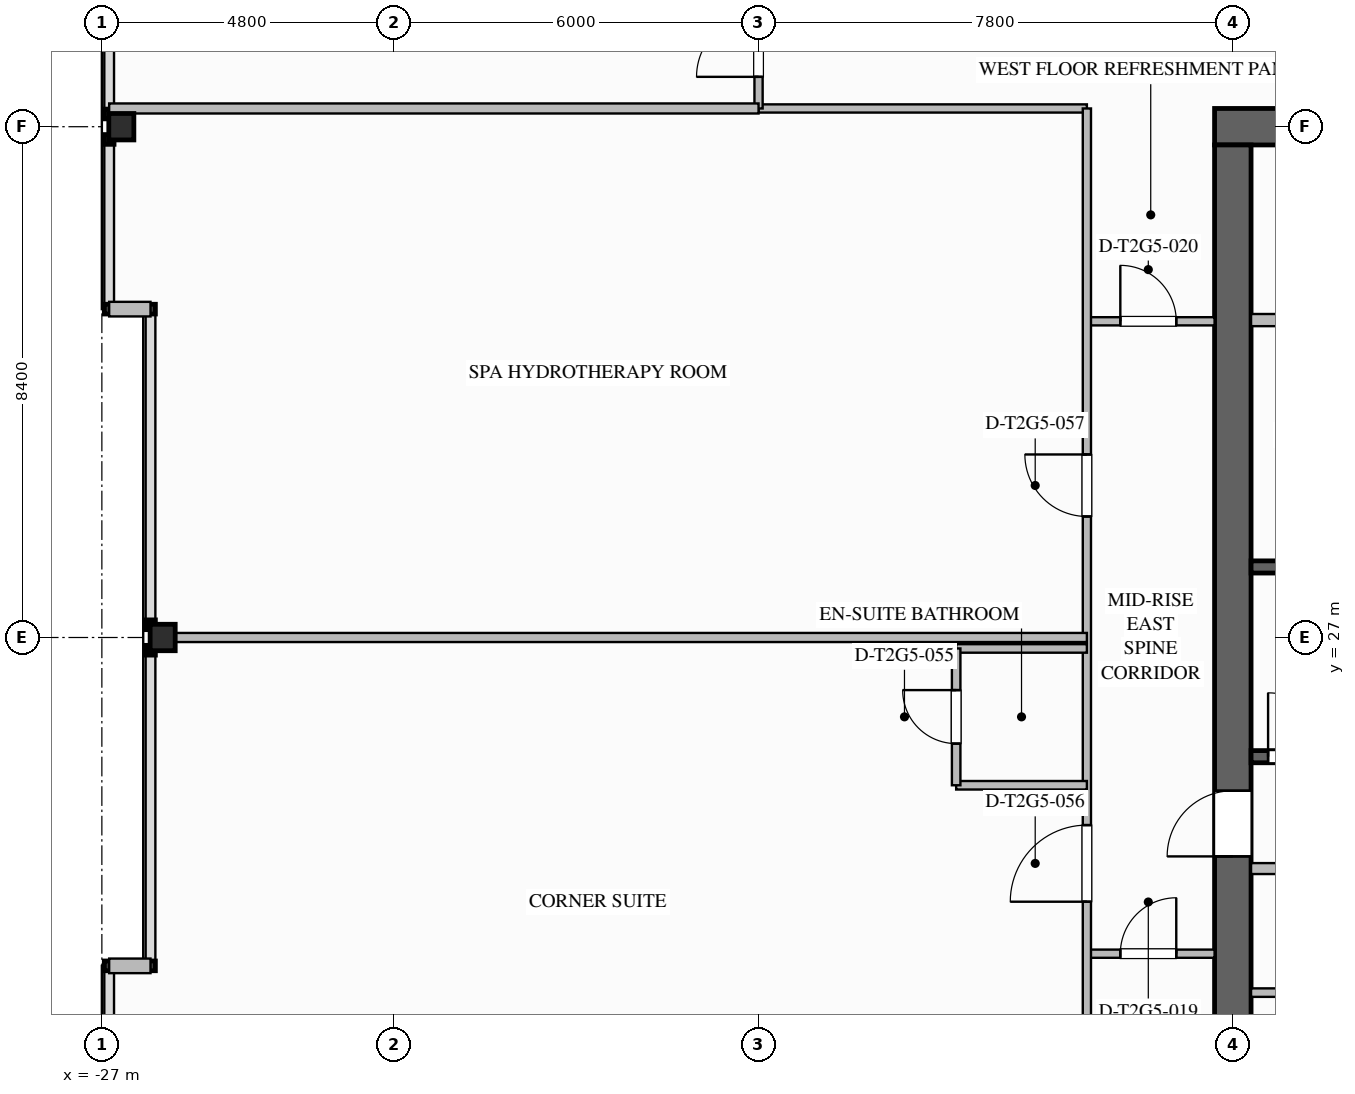
"""IFC4 building model, lengths in metres.
Left out: names, types, materials, properties, quantities, classifications, styles, units other than length and angle.
Written with IfcOpenShell. Run it as: python <this file> out.ifc"""

import sys

from ifc_helpers import new_model, si_unit, direction, frame, frame_2d, origin, origin_2d, place, context, subcontext, project, spatial, rectangle, i_section, extrude, element, fill, save


model = new_model("IFC4")
c1 = context("Model", 3, precision=1e-05, world=origin(), true_north=direction((0.0, 1.0)))
c2 = subcontext(c1, "Body", "Model", "MODEL_VIEW")
j1 = project(units=[si_unit("LENGTHUNIT", "METRE"), si_unit("PLANEANGLEUNIT", "RADIAN")], contexts=[c1])
p1 = place(None, origin())
s1 = spatial("IfcSite", under=j1, at=p1, CompositionType="ELEMENT")
p2 = place(p1, origin())
s2 = spatial("IfcBuilding", under=s1, at=p2, CompositionType="ELEMENT")
p3 = place(p2, frame((0.0, 0.0, 133.8)))
s3 = spatial("IfcBuildingStorey", under=s2, at=p3, CompositionType="ELEMENT", Elevation=133.8)
p4 = place(p3, frame((-8.7, 35.4, 0.0), z_axis=(0.0, 0.0, 1.0), x_axis=(1.0, 0.0, 0.0)))
e1 = element("IfcWall", 1, at=p4, inside=s3, PredefinedType="SHEAR", context=c2, shape_type="SweptSolid", body=[
    extrude(rectangle(XDim=17.4, YDim=0.6, at=frame_2d((8.7, 0.0))), origin(), (0.0, 0.0, 1.0), 3.5),
])
p5 = place(p3, frame((-8.4, 18.9, 0.0), z_axis=(0.0, 0.0, 1.0), x_axis=(0.0, 1.0, 0.0)))
e2 = element("IfcWall", 2, at=p5, inside=s3, PredefinedType="SHEAR", context=c2, shape_type="SweptSolid", body=[
    extrude(rectangle(XDim=16.2, YDim=0.6, at=frame_2d((8.1, 0.0))), origin(), (0.0, 0.0, 1.0), 3.5),
])
p6 = place(p5, frame((4.5, 0.0, 0.0)))
e3 = element("IfcOpeningElement", 3, at=p6, cuts=e2, PredefinedType="OPENING", context=c2, shape_type="SweptSolid", body=[
    extrude(rectangle(XDim=1.08, YDim=2.04, at=frame_2d((0.54, 1.02))), frame((0.0, 0.31, 0.0), z_axis=(0.0, -1.0, 0.0), x_axis=(1.0, 0.0, 0.0)), (0.0, 0.0, 1.0), 0.62),
])
for number, where, z_axis, x_axis in (
    (4, (-26.0, 27.0, 0.0), (0.0, 0.0, 1.0), (1.0, 0.0, 0.0)),
    (5, (-26.68, 35.4, 0.0), (0.0, 0.0, 1.0), (1.0, 0.0, 0.0)),
):
    element("IfcColumn", number, at=place(p3, frame(where, z_axis=z_axis, x_axis=x_axis)), inside=s3, PredefinedType="COLUMN", context=c2, shape_type="SweptSolid", body=[
        extrude(i_section(OverallWidth=0.412, OverallDepth=0.435, WebThickness=0.036, FlangeThickness=0.057, FilletRadius=0.028, at=origin_2d()), origin(), (0.0, 0.0, 1.0), 3.497),
    ])
for number, where, z_axis, x_axis in (
    (6, (-26.88, 21.6, 0.0), (0.0, 0.0, 1.0), (1.0, 0.0, 0.0)),
    (7, (-26.2, 32.4, 0.0), (0.0, 0.0, 1.0), (-1.0, 0.0, 0.0)),
):
    element("IfcWall", number, at=place(p3, frame(where, z_axis=z_axis, x_axis=x_axis)), inside=s3, PredefinedType="STANDARD", context=c2, shape_type="SweptSolid", body=[
        extrude(rectangle(XDim=0.68, YDim=0.24, at=frame_2d((0.34, 0.0))), origin(), (0.0, 0.0, 1.0), 3.24),
    ])
p7 = place(p3, frame((-8.1, 25.04, 0.0), z_axis=(0.0, 0.0, 1.0), x_axis=(1.0, 0.0, 0.0)))
e8 = element("IfcWall", 8, at=p7, inside=s3, PredefinedType="SOLIDWALL", context=c2, shape_type="SweptSolid", body=[
    extrude(rectangle(XDim=8.1, YDim=0.2, at=frame_2d((4.05, 0.0))), origin(), (0.0, 0.0, 1.0), 3.24),
])
p8 = place(p7, frame((0.28, 0.0, 0.0)))
e9 = element("IfcOpeningElement", 9, at=p8, cuts=e8, PredefinedType="OPENING", context=c2, shape_type="SweptSolid", body=[
    extrude(rectangle(XDim=1.05, YDim=2.1, at=frame_2d((0.525, 1.05))), frame((0.0, 0.11, 0.0), z_axis=(0.0, -1.0, 0.0), x_axis=(1.0, 0.0, 0.0)), (0.0, 0.0, 1.0), 0.22),
])
p9 = place(p3, frame((-8.1, 28.16, 0.0), z_axis=(0.0, 0.0, 1.0), x_axis=(1.0, 0.0, 0.0)))
e10 = element("IfcWall", 10, at=p9, inside=s3, PredefinedType="SOLIDWALL", context=c2, shape_type="SweptSolid", body=[
    extrude(rectangle(XDim=8.1, YDim=0.2, at=frame_2d((4.05, 0.0))), origin(), (0.0, 0.0, 1.0), 3.24),
])
p10 = place(p3, frame((-8.1, 32.22, 0.0), z_axis=(0.0, 0.0, 1.0), x_axis=(1.0, 0.0, 0.0)))
e11 = element("IfcWall", 11, at=p10, inside=s3, PredefinedType="SOLIDWALL", context=c2, shape_type="SweptSolid", body=[
    extrude(rectangle(XDim=7.1, YDim=0.2, at=frame_2d((3.55, 0.0))), origin(), (0.0, 0.0, 1.0), 3.24),
])
p11 = place(p3, frame((-8.1, 23.2, 0.0), z_axis=(0.0, 0.0, 1.0), x_axis=(1.0, 0.0, 0.0)))
e12 = element("IfcWall", 12, at=p11, inside=s3, PredefinedType="SOLIDWALL", context=c2, shape_type="SweptSolid", body=[
    extrude(rectangle(XDim=8.65, YDim=0.18, at=frame_2d((4.325, 0.0))), origin(), (0.0, 0.0, 1.0), 3.24),
])
p12 = place(p11, frame((1.4, 0.0, 0.0)))
e13 = element("IfcOpeningElement", 13, at=p12, cuts=e12, PredefinedType="OPENING", context=c2, shape_type="SweptSolid", body=[
    extrude(rectangle(XDim=1.0, YDim=2.1, at=frame_2d((0.5, 1.05))), frame((0.0, 0.1, 0.0), z_axis=(0.0, -1.0, 0.0), x_axis=(1.0, 0.0, 0.0)), (0.0, 0.0, 1.0), 0.2),
])
p13 = place(p11, frame((5.6, 0.0, 0.0)))
e14 = element("IfcOpeningElement", 14, at=p13, cuts=e12, PredefinedType="OPENING", context=c2, shape_type="SweptSolid", body=[
    extrude(rectangle(XDim=0.92, YDim=2.1, at=frame_2d((0.46, 1.05))), frame((0.0, 0.1, 0.0), z_axis=(0.0, -1.0, 0.0), x_axis=(1.0, 0.0, 0.0)), (0.0, 0.0, 1.0), 0.2),
])
p14 = place(p3, frame((-8.1, 21.16, 0.0), z_axis=(0.0, 0.0, 1.0), x_axis=(1.0, 0.0, 0.0)))
e15 = element("IfcWall", 15, at=p14, inside=s3, PredefinedType="PLUMBINGWALL", context=c2, shape_type="SweptSolid", body=[
    extrude(rectangle(XDim=8.65, YDim=0.14, at=frame_2d((4.325, 0.0))), origin(), (0.0, 0.0, 1.0), 3.24),
])
p15 = place(p14, frame((1.4, 0.0, 0.0)))
e16 = element("IfcOpeningElement", 16, at=p15, cuts=e15, PredefinedType="OPENING", context=c2, shape_type="SweptSolid", body=[
    extrude(rectangle(XDim=0.92, YDim=2.1, at=frame_2d((0.46, 1.05))), frame((0.0, 0.08, 0.0), z_axis=(0.0, -1.0, 0.0), x_axis=(1.0, 0.0, 0.0)), (0.0, 0.0, 1.0), 0.16),
])
p16 = place(p3, frame((-10.8, 21.8, 0.0), z_axis=(0.0, 0.0, 1.0), x_axis=(1.0, 0.0, 0.0)))
e17 = element("IfcWall", 17, at=p16, inside=s3, PredefinedType="PARTITIONING", context=c2, shape_type="SweptSolid", body=[
    extrude(rectangle(XDim=2.1, YDim=0.135, at=frame_2d((1.05, 0.0))), origin(), (0.0, 0.0, 1.0), 3.24),
])
p17 = place(p16, frame((0.55, 0.0, 0.0)))
e18 = element("IfcOpeningElement", 18, at=p17, cuts=e17, PredefinedType="OPENING", context=c2, shape_type="SweptSolid", body=[
    extrude(rectangle(XDim=0.92, YDim=2.1, at=frame_2d((0.46, 1.05))), frame((0.0, 0.077, 0.0), z_axis=(0.0, -1.0, 0.0), x_axis=(1.0, 0.0, 0.0)), (0.0, 0.0, 1.0), 0.155),
])
p18 = place(p3, frame((-10.8, 32.2, 0.0), z_axis=(0.0, 0.0, 1.0), x_axis=(1.0, 0.0, 0.0)))
e19 = element("IfcWall", 19, at=p18, inside=s3, PredefinedType="PARTITIONING", context=c2, shape_type="SweptSolid", body=[
    extrude(rectangle(XDim=2.1, YDim=0.135, at=frame_2d((1.05, 0.0))), origin(), (0.0, 0.0, 1.0), 3.24),
])
p19 = place(p18, frame((0.55, 0.0, 0.0)))
e20 = element("IfcOpeningElement", 20, at=p19, cuts=e19, PredefinedType="OPENING", context=c2, shape_type="SweptSolid", body=[
    extrude(rectangle(XDim=0.92, YDim=2.1, at=frame_2d((0.46, 1.05))), frame((0.0, 0.077, 0.0), z_axis=(0.0, -1.0, 0.0), x_axis=(1.0, 0.0, 0.0)), (0.0, 0.0, 1.0), 0.155),
])
p20 = place(p3, frame((-16.2, 35.7, 0.0), z_axis=(0.0, 0.0, 1.0), x_axis=(1.0, 0.0, 0.0)))
e21 = element("IfcWall", 21, at=p20, inside=s3, PredefinedType="PARTITIONING", context=c2, shape_type="SweptSolid", body=[
    extrude(rectangle(XDim=5.4, YDim=0.135, at=frame_2d((2.7, 0.0))), origin(), (0.0, 0.0, 1.0), 3.24),
])
p21 = place(p3, frame((-10.8, 18.3, 0.0), z_axis=(0.0, 0.0, 1.0), x_axis=(0.0, 1.0, 0.0)))
e22 = element("IfcWall", 22, at=p21, inside=s3, PredefinedType="PARTITIONING", context=c2, shape_type="SweptSolid", body=[
    extrude(rectangle(XDim=17.4, YDim=0.135, at=frame_2d((8.7, 0.0))), origin(), (0.0, 0.0, 1.0), 3.24),
])
p22 = place(p21, frame((4.355, 0.0, 0.0)))
e23 = element("IfcOpeningElement", 23, at=p22, cuts=e22, PredefinedType="OPENING", context=c2, shape_type="SweptSolid", body=[
    extrude(rectangle(XDim=1.26, YDim=2.2, at=frame_2d((0.63, 1.1))), frame((0.0, 0.077, 0.0), z_axis=(0.0, -1.0, 0.0), x_axis=(1.0, 0.0, 0.0)), (0.0, 0.0, 1.0), 0.155),
])
p23 = place(p21, frame((10.69, 0.0, 0.0)))
e24 = element("IfcOpeningElement", 24, at=p23, cuts=e22, PredefinedType="OPENING", context=c2, shape_type="SweptSolid", body=[
    extrude(rectangle(XDim=1.02, YDim=2.15, at=frame_2d((0.51, 1.075))), frame((0.0, 0.077, 0.0), z_axis=(0.0, -1.0, 0.0), x_axis=(1.0, 0.0, 0.0)), (0.0, 0.0, 1.0), 0.155),
])
p24 = place(p3, frame((-16.2, 35.7, 0.0), z_axis=(0.0, 0.0, 1.0), x_axis=(0.0, 1.0, 0.0)))
e25 = element("IfcWall", 25, at=p24, inside=s3, PredefinedType="PARTITIONING", context=c2, shape_type="SweptSolid", body=[
    extrude(rectangle(XDim=3.05, YDim=0.135, at=frame_2d((1.525, 0.0))), origin(), (0.0, 0.0, 1.0), 2.53),
])
p25 = place(p24, frame((0.52, 0.0, 0.0)))
e26 = element("IfcOpeningElement", 26, at=p25, cuts=e25, PredefinedType="OPENING", context=c2, shape_type="SweptSolid", body=[
    extrude(rectangle(XDim=1.02, YDim=2.15, at=frame_2d((0.51, 1.075))), frame((0.0, 0.077, 0.0), z_axis=(0.0, -1.0, 0.0), x_axis=(1.0, 0.0, 0.0)), (0.0, 0.0, 1.0), 0.155),
])
p26 = place(p3, frame((-26.88, 35.7, 0.0), z_axis=(0.0, 0.0, 1.0), x_axis=(1.0, 0.0, 0.0)))
e27 = element("IfcWall", 27, at=p26, inside=s3, PredefinedType="PARTITIONING", context=c2, shape_type="SweptSolid", body=[
    extrude(rectangle(XDim=10.68, YDim=0.165, at=frame_2d((5.34, 0.0))), origin(), (0.0, 0.0, 1.0), 2.53),
])
p27 = place(p3, frame((-26.2, 27.0, 0.0), z_axis=(0.0, 0.0, 1.0), x_axis=(1.0, 0.0, 0.0)))
e28 = element("IfcWall", 28, at=p27, inside=s3, PredefinedType="PARTITIONING", context=c2, shape_type="SweptSolid", body=[
    extrude(rectangle(XDim=15.4, YDim=0.15, at=frame_2d((7.7, 0.0))), origin(), (0.0, 0.0, 1.0), 2.53),
])
p28 = place(p3, frame((-10.8, 24.57, 0.0), z_axis=(0.0, 0.0, 1.0), x_axis=(-1.0, 0.0, 0.0)))
e29 = element("IfcWall", 29, at=p28, inside=s3, PredefinedType="PLUMBINGWALL", context=c2, shape_type="SweptSolid", body=[
    extrude(rectangle(XDim=2.15, YDim=0.14, at=frame_2d((1.075, 0.0))), origin(), (0.0, 0.0, 1.0), 3.24),
])
p29 = place(p3, frame((-10.8, 26.82, 0.0), z_axis=(0.0, 0.0, 1.0), x_axis=(-1.0, 0.0, 0.0)))
e30 = element("IfcWall", 30, at=p29, inside=s3, PredefinedType="PLUMBINGWALL", context=c2, shape_type="SweptSolid", body=[
    extrude(rectangle(XDim=2.15, YDim=0.14, at=frame_2d((1.075, 0.0))), origin(), (0.0, 0.0, 1.0), 2.617),
])
p30 = place(p3, frame((-12.95, 24.57, 0.0), z_axis=(0.0, 0.0, 1.0), x_axis=(0.0, 1.0, 0.0)))
e31 = element("IfcWall", 31, at=p30, inside=s3, PredefinedType="PLUMBINGWALL", context=c2, shape_type="SweptSolid", body=[
    extrude(rectangle(XDim=2.25, YDim=0.14, at=frame_2d((1.125, 0.0))), origin(), (0.0, 0.0, 1.0), 3.24),
])
p31 = place(p30, frame((0.685, 0.0, 0.0)))
e32 = element("IfcOpeningElement", 32, at=p31, cuts=e31, PredefinedType="OPENING", context=c2, shape_type="SweptSolid", body=[
    extrude(rectangle(XDim=0.88, YDim=2.1, at=frame_2d((0.44, 1.05))), frame((0.0, 0.08, 0.0), z_axis=(0.0, -1.0, 0.0), x_axis=(1.0, 0.0, 0.0)), (0.0, 0.0, 1.0), 0.16),
])
p32 = place(p8, origin())
e33 = element("IfcDoor", 33, at=p32, inside=s3, OperationType="SINGLE_SWING_LEFT", PredefinedType="DOOR", context=c2, shape_type="SweptSolid", body=[
    extrude(rectangle(XDim=1.05, YDim=2.1, at=frame_2d((0.525, 1.05))), frame((0.0, 0.025, 0.0), z_axis=(0.0, -1.0, 0.0), x_axis=(1.0, 0.0, 0.0)), (0.0, 0.0, 1.0), 0.05),
])
fill(e9, e33)
p33 = place(p6, origin())
e34 = element("IfcDoor", 34, at=p33, inside=s3, OperationType="SINGLE_SWING_LEFT", PredefinedType="DOOR", context=c2, shape_type="SweptSolid", body=[
    extrude(rectangle(XDim=1.08, YDim=2.04, at=frame_2d((0.54, 1.02))), frame((0.0, 0.025, 0.0), z_axis=(0.0, -1.0, 0.0), x_axis=(1.0, 0.0, 0.0)), (0.0, 0.0, 1.0), 0.05),
])
fill(e3, e34)
p34 = place(p17, origin())
e35 = element("IfcDoor", 35, at=p34, inside=s3, OperationType="SINGLE_SWING_RIGHT", PredefinedType="DOOR", context=c2, shape_type="SweptSolid", body=[
    extrude(rectangle(XDim=0.92, YDim=2.1, at=frame_2d((0.46, 1.05))), frame((0.0, 0.025, 0.0), z_axis=(0.0, -1.0, 0.0), x_axis=(1.0, 0.0, 0.0)), (0.0, 0.0, 1.0), 0.05),
])
fill(e18, e35)
p35 = place(p19, origin())
e36 = element("IfcDoor", 36, at=p35, inside=s3, OperationType="SINGLE_SWING_LEFT", PredefinedType="DOOR", context=c2, shape_type="SweptSolid", body=[
    extrude(rectangle(XDim=0.92, YDim=2.1, at=frame_2d((0.46, 1.05))), frame((0.0, 0.025, 0.0), z_axis=(0.0, -1.0, 0.0), x_axis=(1.0, 0.0, 0.0)), (0.0, 0.0, 1.0), 0.05),
])
fill(e20, e36)
p36 = place(p25, origin())
e37 = element("IfcDoor", 37, at=p36, inside=s3, OperationType="SINGLE_SWING_LEFT", PredefinedType="DOOR", context=c2, shape_type="SweptSolid", body=[
    extrude(rectangle(XDim=1.02, YDim=2.15, at=frame_2d((0.51, 1.075))), frame((0.0, 0.025, 0.0), z_axis=(0.0, -1.0, 0.0), x_axis=(1.0, 0.0, 0.0)), (0.0, 0.0, 1.0), 0.05),
])
fill(e26, e37)
p37 = place(p31, origin())
e38 = element("IfcDoor", 38, at=p37, inside=s3, OperationType="SINGLE_SWING_RIGHT", PredefinedType="DOOR", context=c2, shape_type="SweptSolid", body=[
    extrude(rectangle(XDim=0.88, YDim=2.1, at=frame_2d((0.44, 1.05))), frame((0.0, 0.025, 0.0), z_axis=(0.0, -1.0, 0.0), x_axis=(1.0, 0.0, 0.0)), (0.0, 0.0, 1.0), 0.05),
])
fill(e32, e38)
p38 = place(p22, origin())
e39 = element("IfcDoor", 39, at=p38, inside=s3, OperationType="SINGLE_SWING_LEFT", PredefinedType="DOOR", context=c2, shape_type="SweptSolid", body=[
    extrude(rectangle(XDim=1.26, YDim=2.2, at=frame_2d((0.63, 1.1))), frame((0.0, 0.025, 0.0), z_axis=(0.0, -1.0, 0.0), x_axis=(1.0, 0.0, 0.0)), (0.0, 0.0, 1.0), 0.05),
])
fill(e23, e39)
p39 = place(p23, origin())
e40 = element("IfcDoor", 40, at=p39, inside=s3, OperationType="SINGLE_SWING_RIGHT", PredefinedType="DOOR", context=c2, shape_type="SweptSolid", body=[
    extrude(rectangle(XDim=1.02, YDim=2.15, at=frame_2d((0.51, 1.075))), frame((0.0, 0.025, 0.0), z_axis=(0.0, -1.0, 0.0), x_axis=(1.0, 0.0, 0.0)), (0.0, 0.0, 1.0), 0.05),
])
fill(e24, e40)
save(model, sys.argv[1])
